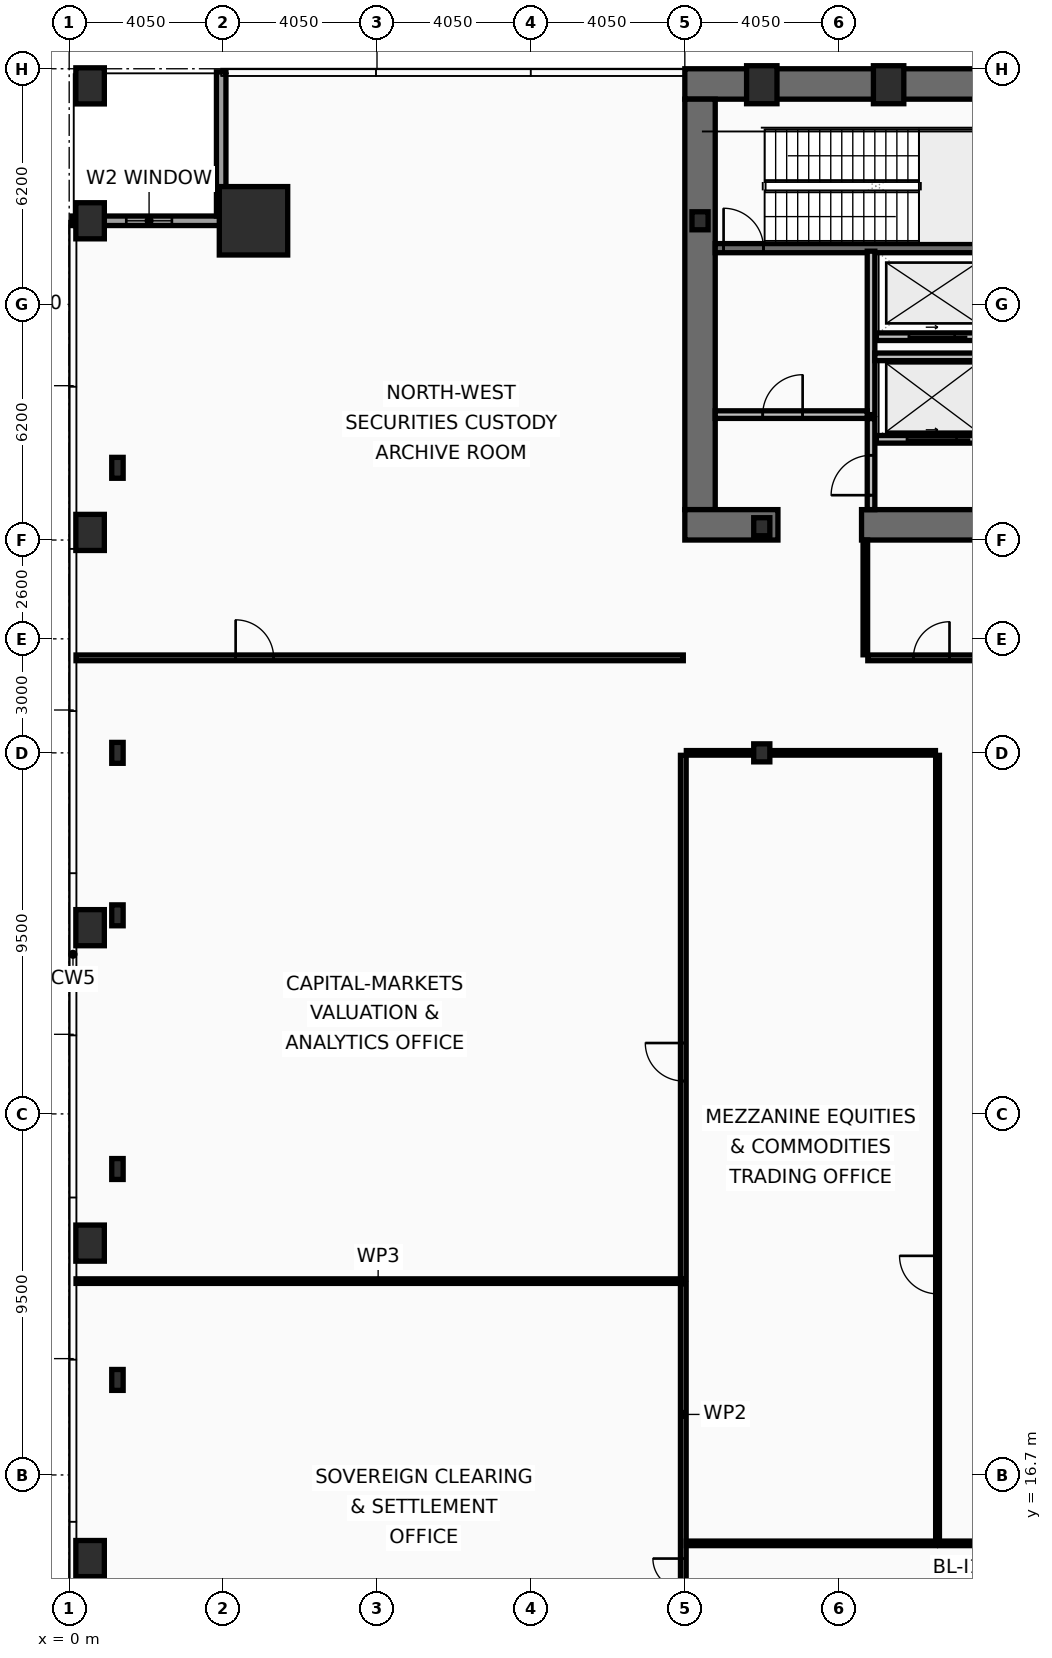
"""IFC4 building model, lengths in metres.
Left out: names, types, materials, properties, quantities, classifications, styles, units other than length and angle.
Written with IfcOpenShell. Run it as: python <this file> out.ifc"""

import sys

from ifc_helpers import new_model, si_unit, direction, frame, frame_2d, origin, origin_2d, place, context, subcontext, project, spatial, rectangle, hollow_rectangle, i_section, extrude, element, fill, save


model = new_model("IFC4")
c1 = context("Model", 3, precision=1e-05, world=origin(), true_north=direction((0.0, 1.0)))
c2 = subcontext(c1, "Body", "Model", "MODEL_VIEW")
j1 = project(units=[si_unit("LENGTHUNIT", "METRE"), si_unit("PLANEANGLEUNIT", "RADIAN")], contexts=[c1])
p1 = place(None, origin())
s1 = spatial("IfcSite", under=j1, at=p1, CompositionType="ELEMENT")
p2 = place(p1, origin())
s2 = spatial("IfcBuilding", under=s1, at=p2, CompositionType="ELEMENT")
p3 = place(p2, frame((0.0, 0.0, 15.4)))
s3 = spatial("IfcBuildingStorey", under=s2, at=p3, CompositionType="ELEMENT", Elevation=15.4)
p4 = place(p3, frame((16.2, 53.3, 0.0), z_axis=(0.0, 0.0, 1.0), x_axis=(1.0, 0.0, 0.0)))
e1 = element("IfcWall", 1, at=p4, inside=s3, PredefinedType="SHEAR", context=c2, shape_type="SweptSolid", body=[
    extrude(rectangle(XDim=40.5, YDim=0.8, at=frame_2d((20.25, 0.0))), origin(), (0.0, 0.0, 1.0), 4.78),
])
p5 = place(p3, frame((16.6, 42.1, 0.0), z_axis=(0.0, 0.0, 1.0), x_axis=(0.0, 1.0, 0.0)))
e2 = element("IfcWall", 2, at=p5, inside=s3, PredefinedType="SHEAR", context=c2, shape_type="SweptSolid", body=[
    extrude(rectangle(XDim=10.8, YDim=0.8, at=frame_2d((5.4, 0.0))), origin(), (0.0, 0.0, 1.0), 4.78),
])
p6 = place(p3, frame((18.65, 41.7, 0.0), z_axis=(0.0, 0.0, 1.0), x_axis=(-1.0, 0.0, 0.0)))
e3 = element("IfcWall", 3, at=p6, inside=s3, PredefinedType="SHEAR", context=c2, shape_type="SweptSolid", body=[
    extrude(rectangle(XDim=2.45, YDim=0.8, at=frame_2d((1.225, 0.0))), origin(), (0.0, 0.0, 1.0), 4.78),
])
p7 = place(p3, frame((32.3, 41.7, 0.0), z_axis=(0.0, 0.0, 1.0), x_axis=(-1.0, 0.0, 0.0)))
e4 = element("IfcWall", 4, at=p7, inside=s3, PredefinedType="SHEAR", context=c2, shape_type="SweptSolid", body=[
    extrude(rectangle(XDim=11.45, YDim=0.8, at=frame_2d((5.725, 0.0))), origin(), (0.0, 0.0, 1.0), 4.78),
])
p8 = place(p3, frame((17.0, 48.98, 0.0), z_axis=(0.0, 0.0, 1.0), x_axis=(1.0, 0.0, 0.0)))
e5 = element("IfcWall", 5, at=p8, inside=s3, PredefinedType="SHEAR", context=c2, shape_type="SweptSolid", body=[
    extrude(rectangle(XDim=7.22, YDim=0.24, at=frame_2d((3.61, 0.0))), origin(), (0.0, 0.0, 1.0), 4.78),
])
p9 = place(p8, frame((0.22, 0.0, 0.0)))
e6 = element("IfcOpeningElement", 6, at=p9, cuts=e5, PredefinedType="OPENING", context=c2, shape_type="SweptSolid", body=[
    extrude(rectangle(XDim=1.05, YDim=2.15, at=frame_2d((0.525, 1.075))), frame((0.0, 0.13, 0.0), z_axis=(0.0, -1.0, 0.0), x_axis=(1.0, 0.0, 0.0)), (0.0, 0.0, 1.0), 0.26),
])
p10 = place(p3, frame((4.85, 49.7, 0.0), z_axis=(0.0, 0.0, 1.0), x_axis=(1.0, 0.0, 0.0)))
e7 = element("IfcColumn", 7, at=p10, inside=s3, PredefinedType="COLUMN", context=c2, shape_type="SweptSolid", body=[
    extrude(hollow_rectangle(XDim=1.8, YDim=1.8, WallThickness=0.08, at=origin_2d()), origin(), (0.0, 0.0, 1.0), 5.0),
])
for number, where, z_axis, x_axis in (
    (8, (18.225, 53.28, 0.0), (0.0, 0.0, 1.0), (1.0, 0.0, 0.0)),
    (9, (21.562, 53.28, 0.0), (0.0, 0.0, 1.0), (1.0, 0.0, 0.0)),
):
    element("IfcColumn", number, at=place(p3, frame(where, z_axis=z_axis, x_axis=x_axis)), inside=s3, PredefinedType="COLUMN", context=c2, shape_type="SweptSolid", body=[
        extrude(hollow_rectangle(XDim=0.8, YDim=1.0, WallThickness=0.055, at=origin_2d()), origin(), (0.0, 0.0, 1.0), 5.0),
    ])
for number, where, z_axis, x_axis in (
    (10, (1.27, 19.2, 0.0), (0.0, 0.0, 1.0), (1.0, 0.0, 0.0)),
    (11, (1.27, 24.75, 0.0), (0.0, 0.0, 1.0), (1.0, 0.0, 0.0)),
    (12, (1.27, 31.425, 0.0), (0.0, 0.0, 1.0), (1.0, 0.0, 0.0)),
    (13, (1.27, 35.7, 0.0), (0.0, 0.0, 1.0), (1.0, 0.0, 0.0)),
    (14, (1.27, 43.2, 0.0), (0.0, 0.0, 1.0), (1.0, 0.0, 0.0)),
):
    element("IfcColumn", number, at=place(p3, frame(where, z_axis=z_axis, x_axis=x_axis)), inside=s3, PredefinedType="COLUMN", context=c2, shape_type="SweptSolid", body=[
        extrude(i_section(OverallWidth=0.3, OverallDepth=0.55, WebThickness=0.015, FlangeThickness=0.029, at=origin_2d()), origin(), (0.0, 0.0, 1.0), 5.0),
    ])
for number, where, z_axis, x_axis in (
    (15, (16.6, 49.7, 0.0), (0.0, 0.0, 1.0), (1.0, 0.0, 0.0)),
    (16, (18.225, 35.7, 0.0), (0.0, 0.0, 1.0), (1.0, 0.0, 0.0)),
    (17, (18.225, 41.65, 0.0), (0.0, 0.0, 1.0), (1.0, 0.0, 0.0)),
):
    element("IfcColumn", number, at=place(p3, frame(where, z_axis=z_axis, x_axis=x_axis)), inside=s3, PredefinedType="COLUMN", context=c2, shape_type="SweptSolid", body=[
        extrude(i_section(OverallWidth=0.424, OverallDepth=0.474, WebThickness=0.048, FlangeThickness=0.077, at=origin_2d()), origin(), (0.0, 0.0, 1.0), 5.0),
    ])
for number, where, z_axis, x_axis in (
    (18, (0.55, 49.7, 0.0), (0.0, 0.0, 1.0), (1.0, 0.0, 0.0)),
    (19, (0.55, 53.25, 0.0), (0.0, 0.0, 1.0), (1.0, 0.0, 0.0)),
    (20, (0.55, 14.5, 0.0), (0.0, 0.0, 1.0), (1.0, 0.0, 0.0)),
    (21, (0.55, 22.8, 0.0), (0.0, 0.0, 1.0), (1.0, 0.0, 0.0)),
    (22, (0.55, 31.1, 0.0), (0.0, 0.0, 1.0), (1.0, 0.0, 0.0)),
    (23, (0.55, 41.5, 0.0), (0.0, 0.0, 1.0), (1.0, 0.0, 0.0)),
):
    element("IfcColumn", number, at=place(p3, frame(where, z_axis=z_axis, x_axis=x_axis)), inside=s3, PredefinedType="PILASTER", context=c2, shape_type="SweptSolid", body=[
        extrude(rectangle(XDim=0.75, YDim=0.95, at=origin_2d()), origin(), (0.0, 0.0, 1.0), 5.0),
    ])
p11 = place(p3, frame((0.08, 49.7, 0.0), z_axis=(0.0, 0.0, 1.0), x_axis=(1.0, 0.0, 0.0)))
e24 = element("IfcWall", 24, at=p11, inside=s3, PredefinedType="SOLIDWALL", context=c2, shape_type="SweptSolid", body=[
    extrude(rectangle(XDim=4.045, YDim=0.25, at=frame_2d((2.022, 0.0))), origin(), (0.0, 0.0, 1.0), 4.12),
])
p12 = place(p11, frame((1.423, 0.0, 0.9)))
e25 = element("IfcOpeningElement", 25, at=p12, cuts=e24, PredefinedType="OPENING", context=c2, shape_type="SweptSolid", body=[
    extrude(rectangle(XDim=1.2, YDim=2.8, at=frame_2d((0.6, 1.4))), frame((0.0, 0.135, 0.0), z_axis=(0.0, -1.0, 0.0), x_axis=(1.0, 0.0, 0.0)), (0.0, 0.0, 1.0), 0.27),
])
p13 = place(p3, frame((4.0, 49.825, 0.0), z_axis=(0.0, 0.0, 1.0), x_axis=(0.0, 1.0, 0.0)))
e26 = element("IfcWall", 26, at=p13, inside=s3, PredefinedType="SOLIDWALL", context=c2, shape_type="SweptSolid", body=[
    extrude(rectangle(XDim=3.795, YDim=0.25, at=frame_2d((1.897, 0.0))), origin(), (0.0, 0.0, 1.0), 4.12),
])
p14 = place(p3, frame((24.21, 43.95, 0.0), z_axis=(0.0, 0.0, 1.0), x_axis=(-1.0, 0.0, 0.0)))
e27 = element("IfcWall", 27, at=p14, inside=s3, PredefinedType="PARTITIONING", context=c2, shape_type="SweptSolid", body=[
    extrude(rectangle(XDim=2.97, YDim=0.2, at=frame_2d((1.485, 0.0))), origin(), (0.0, 0.0, 1.0), 4.78),
])
p15 = place(p14, frame((0.86, 0.0, 0.0)))
e28 = element("IfcOpeningElement", 28, at=p15, cuts=e27, PredefinedType="OPENING", context=c2, shape_type="SweptSolid", body=[
    extrude(rectangle(XDim=1.3, YDim=2.18, at=frame_2d((0.65, 1.09))), frame((0.0, 0.11, 0.0), z_axis=(0.0, -1.0, 0.0), x_axis=(1.0, 0.0, 0.0)), (0.0, 0.0, 1.0), 0.22),
])
p16 = place(p3, frame((24.21, 46.65, 0.0), z_axis=(0.0, 0.0, 1.0), x_axis=(-1.0, 0.0, 0.0)))
e29 = element("IfcWall", 29, at=p16, inside=s3, PredefinedType="PARTITIONING", context=c2, shape_type="SweptSolid", body=[
    extrude(rectangle(XDim=2.97, YDim=0.2, at=frame_2d((1.485, 0.0))), origin(), (0.0, 0.0, 1.0), 4.78),
])
p17 = place(p16, frame((0.91, 0.0, 0.0)))
e30 = element("IfcOpeningElement", 30, at=p17, cuts=e29, PredefinedType="OPENING", context=c2, shape_type="SweptSolid", body=[
    extrude(rectangle(XDim=1.2, YDim=2.18, at=frame_2d((0.6, 1.09))), frame((0.0, 0.11, 0.0), z_axis=(0.0, -1.0, 0.0), x_axis=(1.0, 0.0, 0.0)), (0.0, 0.0, 1.0), 0.22),
])
p18 = place(p3, frame((21.1, 44.6, 0.0), z_axis=(0.0, 0.0, 1.0), x_axis=(0.0, 1.0, 0.0)))
e31 = element("IfcWall", 31, at=p18, inside=s3, PredefinedType="PARTITIONING", context=c2, shape_type="SweptSolid", body=[
    extrude(rectangle(XDim=4.3, YDim=0.2, at=frame_2d((2.15, 0.0))), origin(), (0.0, 0.0, 1.0), 4.78),
])
p19 = place(p3, frame((17.0, 44.6, 0.0), z_axis=(0.0, 0.0, 1.0), x_axis=(1.0, 0.0, 0.0)))
e32 = element("IfcWall", 32, at=p19, inside=s3, PredefinedType="PARTITIONING", context=c2, shape_type="SweptSolid", body=[
    extrude(rectangle(XDim=4.0, YDim=0.2, at=frame_2d((2.0, 0.0))), origin(), (0.0, 0.0, 1.0), 4.78),
])
p20 = place(p19, frame((1.25, 0.0, 0.0)))
e33 = element("IfcOpeningElement", 33, at=p20, cuts=e32, PredefinedType="OPENING", context=c2, shape_type="SweptSolid", body=[
    extrude(rectangle(XDim=1.05, YDim=2.15, at=frame_2d((0.525, 1.075))), frame((0.0, 0.11, 0.0), z_axis=(0.0, -1.0, 0.0), x_axis=(1.0, 0.0, 0.0)), (0.0, 0.0, 1.0), 0.22),
])
p21 = place(p3, frame((21.2, 46.12, 0.0), z_axis=(0.0, 0.0, 1.0), x_axis=(1.0, 0.0, 0.0)))
e34 = element("IfcWall", 34, at=p21, inside=s3, PredefinedType="PARTITIONING", context=c2, shape_type="SweptSolid", body=[
    extrude(rectangle(XDim=3.02, YDim=0.2, at=frame_2d((1.51, 0.0))), origin(), (0.0, 0.0, 1.0), 4.78),
])
p22 = place(p3, frame((21.1, 42.1, 0.0), z_axis=(0.0, 0.0, 1.0), x_axis=(0.0, 1.0, 0.0)))
e35 = element("IfcWall", 35, at=p22, inside=s3, PredefinedType="PARTITIONING", context=c2, shape_type="SweptSolid", body=[
    extrude(rectangle(XDim=2.395, YDim=0.2, at=frame_2d((1.198, 0.0))), origin(), (0.0, 0.0, 1.0), 4.78),
])
p23 = place(p22, frame((0.38, 0.0, 0.0)))
e36 = element("IfcOpeningElement", 36, at=p23, cuts=e35, PredefinedType="OPENING", context=c2, shape_type="SweptSolid", body=[
    extrude(rectangle(XDim=1.05, YDim=2.15, at=frame_2d((0.525, 1.075))), frame((0.0, 0.11, 0.0), z_axis=(0.0, -1.0, 0.0), x_axis=(1.0, 0.0, 0.0)), (0.0, 0.0, 1.0), 0.22),
])
p24 = place(p3, frame((16.16, 7.45, 0.0), z_axis=(0.0, 0.0, 1.0), x_axis=(0.0, 1.0, 0.0)))
e37 = element("IfcWall", 37, at=p24, inside=s3, PredefinedType="PARTITIONING", context=c2, shape_type="SweptSolid", body=[
    extrude(rectangle(XDim=14.285, YDim=0.15, at=frame_2d((7.143, 0.0))), origin(), (0.0, 0.0, 1.0), 3.87),
])
p25 = place(p24, frame((5.45, 0.0, 0.0)))
e38 = element("IfcOpeningElement", 38, at=p25, cuts=e37, PredefinedType="OPENING", context=c2, shape_type="SweptSolid", body=[
    extrude(rectangle(XDim=1.6, YDim=2.15, at=frame_2d((0.8, 1.075))), frame((0.0, 0.085, 0.0), z_axis=(0.0, -1.0, 0.0), x_axis=(1.0, 0.0, 0.0)), (0.0, 0.0, 1.0), 0.17),
])
p26 = place(p3, frame((16.16, 21.865, 0.0), z_axis=(0.0, 0.0, 1.0), x_axis=(0.0, 1.0, 0.0)))
e39 = element("IfcWall", 39, at=p26, inside=s3, PredefinedType="PARTITIONING", context=c2, shape_type="SweptSolid", body=[
    extrude(rectangle(XDim=13.77, YDim=0.15, at=frame_2d((6.885, 0.0))), origin(), (0.0, 0.0, 1.0), 3.87),
])
p27 = place(p26, frame((5.2, 0.0, 0.0)))
e40 = element("IfcOpeningElement", 40, at=p27, cuts=e39, PredefinedType="OPENING", context=c2, shape_type="SweptSolid", body=[
    extrude(rectangle(XDim=1.0, YDim=2.05, at=frame_2d((0.5, 1.025))), frame((0.0, 0.085, 0.0), z_axis=(0.0, -1.0, 0.0), x_axis=(1.0, 0.0, 0.0)), (0.0, 0.0, 1.0), 0.17),
])
p28 = place(p3, frame((0.18, 21.8, 0.0), z_axis=(0.0, 0.0, 1.0), x_axis=(1.0, 0.0, 0.0)))
e41 = element("IfcWall", 41, at=p28, inside=s3, PredefinedType="PARTITIONING", context=c2, shape_type="SweptSolid", body=[
    extrude(rectangle(XDim=15.9, YDim=0.12, at=frame_2d((7.95, 0.0))), origin(), (0.0, 0.0, 1.0), 4.12),
])
p29 = place(p3, frame((21.015, 38.2, 0.0), z_axis=(0.0, 0.0, 1.0), x_axis=(1.0, 0.0, 0.0)))
e42 = element("IfcWall", 42, at=p29, inside=s3, PredefinedType="PARTITIONING", context=c2, shape_type="SweptSolid", body=[
    extrude(rectangle(XDim=3.72, YDim=0.15, at=frame_2d((1.86, 0.0))), origin(), (0.0, 0.0, 1.0), 3.87),
])
p30 = place(p29, frame((1.2, 0.0, 0.0)))
e43 = element("IfcOpeningElement", 43, at=p30, cuts=e42, PredefinedType="OPENING", context=c2, shape_type="SweptSolid", body=[
    extrude(rectangle(XDim=0.95, YDim=2.05, at=frame_2d((0.475, 1.025))), frame((0.0, 0.085, 0.0), z_axis=(0.0, -1.0, 0.0), x_axis=(1.0, 0.0, 0.0)), (0.0, 0.0, 1.0), 0.17),
])
p31 = place(p3, frame((20.95, 38.28, 0.0), z_axis=(0.0, 0.0, 1.0), x_axis=(0.0, 1.0, 0.0)))
e44 = element("IfcWall", 44, at=p31, inside=s3, PredefinedType="PARTITIONING", context=c2, shape_type="SweptSolid", body=[
    extrude(rectangle(XDim=3.02, YDim=0.12, at=frame_2d((1.51, 0.0))), origin(), (0.0, 0.0, 1.0), 4.78),
])
p32 = place(p3, frame((0.18, 38.2, 0.0), z_axis=(0.0, 0.0, 1.0), x_axis=(1.0, 0.0, 0.0)))
e45 = element("IfcWall", 45, at=p32, inside=s3, PredefinedType="PARTITIONING", context=c2, shape_type="SweptSolid", body=[
    extrude(rectangle(XDim=15.98, YDim=0.15, at=frame_2d((7.99, 0.0))), origin(), (0.0, 0.0, 1.0), 4.12),
])
p33 = place(p32, frame((4.2, 0.0, 0.0)))
e46 = element("IfcOpeningElement", 46, at=p33, cuts=e45, PredefinedType="OPENING", context=c2, shape_type="SweptSolid", body=[
    extrude(rectangle(XDim=1.0, YDim=2.05, at=frame_2d((0.5, 1.025))), frame((0.0, 0.085, 0.0), z_axis=(0.0, -1.0, 0.0), x_axis=(1.0, 0.0, 0.0)), (0.0, 0.0, 1.0), 0.17),
])
p34 = place(p3, frame((22.85, 14.965, 0.0), z_axis=(0.0, 0.0, 1.0), x_axis=(0.0, 1.0, 0.0)))
e47 = element("IfcWall", 47, at=p34, inside=s3, PredefinedType="MOVABLE", context=c2, shape_type="SweptSolid", body=[
    extrude(rectangle(XDim=20.67, YDim=0.1, at=frame_2d((10.335, 0.0))), origin(), (0.0, 0.0, 1.0), 4.17),
])
p35 = place(p34, frame((6.5, 0.0, 0.0)))
e48 = element("IfcOpeningElement", 48, at=p35, cuts=e47, PredefinedType="OPENING", context=c2, shape_type="SweptSolid", body=[
    extrude(rectangle(XDim=1.0, YDim=2.05, at=frame_2d((0.5, 1.025))), frame((0.0, 0.06, 0.0), z_axis=(0.0, -1.0, 0.0), x_axis=(1.0, 0.0, 0.0)), (0.0, 0.0, 1.0), 0.12),
])
for number, where, z_axis, x_axis in (
    (49, (16.24, 14.9, 0.0), (0.0, 0.0, 1.0), (1.0, 0.0, 0.0)),
    (50, (16.24, 35.7, 0.0), (0.0, 0.0, 1.0), (1.0, 0.0, 0.0)),
):
    element("IfcWall", number, at=place(p3, frame(where, z_axis=z_axis, x_axis=x_axis)), inside=s3, PredefinedType="PARTITIONING", context=c2, shape_type="SweptSolid", body=[
        extrude(rectangle(XDim=6.555, YDim=0.12, at=frame_2d((3.277, 0.0))), origin(), (0.0, 0.0, 1.0), 3.87),
    ])
p36 = place(p3, frame((22.905, 14.9, 0.0), z_axis=(0.0, 0.0, 1.0), x_axis=(1.0, 0.0, 0.0)))
e51 = element("IfcWall", 51, at=p36, inside=s3, PredefinedType="PARTITIONING", context=c2, shape_type="SweptSolid", body=[
    extrude(rectangle(XDim=27.09, YDim=0.12, at=frame_2d((13.545, 0.0))), origin(), (0.0, 0.0, 1.0), 3.87),
])
p37 = place(p12, origin())
e52 = element("IfcWindow", 52, at=p37, inside=s3, PartitioningType="SINGLE_PANEL", PredefinedType="WINDOW", context=c2, shape_type="SweptSolid", body=[
    extrude(rectangle(XDim=1.2, YDim=2.8, at=frame_2d((0.6, 1.4))), frame((0.0, 0.03, 0.0), z_axis=(0.0, -1.0, 0.0), x_axis=(1.0, 0.0, 0.0)), (0.0, 0.0, 1.0), 0.06),
])
fill(e25, e52)
p38 = place(p9, origin())
e53 = element("IfcDoor", 53, at=p38, inside=s3, OperationType="SINGLE_SWING_LEFT", PredefinedType="DOOR", context=c2, shape_type="SweptSolid", body=[
    extrude(rectangle(XDim=1.05, YDim=2.15, at=frame_2d((0.525, 1.075))), frame((0.0, 0.025, 0.0), z_axis=(0.0, -1.0, 0.0), x_axis=(1.0, 0.0, 0.0)), (0.0, 0.0, 1.0), 0.05),
])
fill(e6, e53)
p39 = place(p15, origin())
e54 = element("IfcDoor", 54, at=p39, inside=s3, OperationType="SLIDING_TO_LEFT", PredefinedType="DOOR", context=c2, shape_type="SweptSolid", body=[
    extrude(rectangle(XDim=1.3, YDim=2.18, at=frame_2d((0.65, 1.09))), frame((0.0, 0.025, 0.0), z_axis=(0.0, -1.0, 0.0), x_axis=(1.0, 0.0, 0.0)), (0.0, 0.0, 1.0), 0.05),
])
fill(e28, e54)
p40 = place(p17, origin())
e55 = element("IfcDoor", 55, at=p40, inside=s3, OperationType="SLIDING_TO_LEFT", PredefinedType="DOOR", context=c2, shape_type="SweptSolid", body=[
    extrude(rectangle(XDim=1.2, YDim=2.18, at=frame_2d((0.6, 1.09))), frame((0.0, 0.025, 0.0), z_axis=(0.0, -1.0, 0.0), x_axis=(1.0, 0.0, 0.0)), (0.0, 0.0, 1.0), 0.05),
])
fill(e30, e55)
p41 = place(p20, origin())
e56 = element("IfcDoor", 56, at=p41, inside=s3, OperationType="SINGLE_SWING_RIGHT", PredefinedType="DOOR", context=c2, shape_type="SweptSolid", body=[
    extrude(rectangle(XDim=1.05, YDim=2.15, at=frame_2d((0.525, 1.075))), frame((0.0, 0.025, 0.0), z_axis=(0.0, -1.0, 0.0), x_axis=(1.0, 0.0, 0.0)), (0.0, 0.0, 1.0), 0.05),
])
fill(e33, e56)
p42 = place(p23, origin())
e57 = element("IfcDoor", 57, at=p42, inside=s3, OperationType="SINGLE_SWING_LEFT", PredefinedType="DOOR", context=c2, shape_type="SweptSolid", body=[
    extrude(rectangle(XDim=1.05, YDim=2.15, at=frame_2d((0.525, 1.075))), frame((0.0, 0.025, 0.0), z_axis=(0.0, -1.0, 0.0), x_axis=(1.0, 0.0, 0.0)), (0.0, 0.0, 1.0), 0.05),
])
fill(e36, e57)
p43 = place(p25, origin())
e58 = element("IfcDoor", 58, at=p43, inside=s3, OperationType="DOUBLE_DOOR_SINGLE_SWING", PredefinedType="DOOR", context=c2, shape_type="SweptSolid", body=[
    extrude(rectangle(XDim=1.6, YDim=2.15, at=frame_2d((0.8, 1.075))), frame((0.0, 0.025, 0.0), z_axis=(0.0, -1.0, 0.0), x_axis=(1.0, 0.0, 0.0)), (0.0, 0.0, 1.0), 0.05),
])
fill(e38, e58)
p44 = place(p27, origin())
e59 = element("IfcDoor", 59, at=p44, inside=s3, OperationType="SINGLE_SWING_RIGHT", PredefinedType="DOOR", context=c2, shape_type="SweptSolid", body=[
    extrude(rectangle(XDim=1.0, YDim=2.05, at=frame_2d((0.5, 1.025))), frame((0.0, 0.025, 0.0), z_axis=(0.0, -1.0, 0.0), x_axis=(1.0, 0.0, 0.0)), (0.0, 0.0, 1.0), 0.05),
])
fill(e40, e59)
p45 = place(p30, origin())
e60 = element("IfcDoor", 60, at=p45, inside=s3, OperationType="SINGLE_SWING_RIGHT", PredefinedType="DOOR", context=c2, shape_type="SweptSolid", body=[
    extrude(rectangle(XDim=0.95, YDim=2.05, at=frame_2d((0.475, 1.025))), frame((0.0, 0.025, 0.0), z_axis=(0.0, -1.0, 0.0), x_axis=(1.0, 0.0, 0.0)), (0.0, 0.0, 1.0), 0.05),
])
fill(e43, e60)
p46 = place(p33, origin())
e61 = element("IfcDoor", 61, at=p46, inside=s3, OperationType="SINGLE_SWING_LEFT", PredefinedType="DOOR", context=c2, shape_type="SweptSolid", body=[
    extrude(rectangle(XDim=1.0, YDim=2.05, at=frame_2d((0.5, 1.025))), frame((0.0, 0.025, 0.0), z_axis=(0.0, -1.0, 0.0), x_axis=(1.0, 0.0, 0.0)), (0.0, 0.0, 1.0), 0.05),
])
fill(e46, e61)
p47 = place(p35, origin())
e62 = element("IfcDoor", 62, at=p47, inside=s3, OperationType="SINGLE_SWING_RIGHT", PredefinedType="DOOR", context=c2, shape_type="SweptSolid", body=[
    extrude(rectangle(XDim=1.0, YDim=2.05, at=frame_2d((0.5, 1.025))), frame((0.0, 0.025, 0.0), z_axis=(0.0, -1.0, 0.0), x_axis=(1.0, 0.0, 0.0)), (0.0, 0.0, 1.0), 0.05),
])
fill(e48, e62)
save(model, sys.argv[1])
